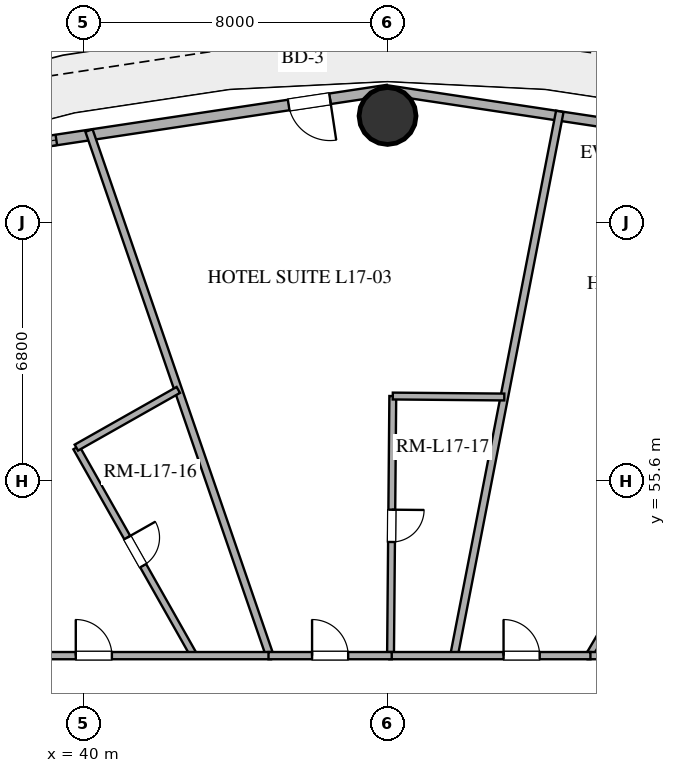
"""IFC4 building model, lengths in metres.
Left out: names, types, materials, properties, quantities, classifications, styles, units other than length and angle.
Written with IfcOpenShell. Run it as: python <this file> out.ifc"""

import sys

from ifc_helpers import new_model, si_unit, direction, frame, frame_2d, origin, origin_2d, place, context, subcontext, project, spatial, rectangle, hollow_circle, extrude, element, fill, save


model = new_model("IFC4")
c1 = context("Model", 3, precision=1e-05, world=origin(), true_north=direction((0.0, 1.0)))
c2 = subcontext(c1, "Body", "Model", "MODEL_VIEW")
j1 = project(units=[si_unit("LENGTHUNIT", "METRE"), si_unit("PLANEANGLEUNIT", "RADIAN")], contexts=[c1])
p1 = place(None, origin())
s1 = spatial("IfcSite", under=j1, at=p1, CompositionType="ELEMENT")
p2 = place(p1, origin())
s2 = spatial("IfcBuilding", under=s1, at=p2, CompositionType="ELEMENT")
p3 = place(p2, frame((0.0, 0.0, 71.4)))
s3 = spatial("IfcBuildingStorey", under=s2, at=p3, CompositionType="ELEMENT", Elevation=71.4)
p4 = place(p3, frame((48.0, 65.2, 0.0), z_axis=(0.0, 0.0, 1.0), x_axis=(1.0, 0.0, 0.0)))
e1 = element("IfcColumn", 1, at=p4, inside=s3, PredefinedType="COLUMN", context=c2, shape_type="SweptSolid", body=[
    extrude(hollow_circle(Radius=0.75, WallThickness=0.04, at=origin_2d()), origin(), (0.0, 0.0, 1.0), 3.38),
])
p5 = place(p3, frame((60.078, 64.062, 0.0), z_axis=(0.0, 0.0, 1.0), x_axis=(-0.988864835849, 0.148816452121, 0.0)))
e2 = element("IfcWall", 2, at=p5, inside=s3, PredefinedType="SOLIDWALL", context=c2, shape_type="SweptSolid", body=[
    extrude(rectangle(XDim=12.214, YDim=0.25, at=frame_2d((6.107, 0.0))), origin(), (0.0, 0.0, 1.0), 3.38),
])
p6 = place(p3, frame((48.0, 65.88, 0.0), z_axis=(0.0, 0.0, 1.0), x_axis=(-0.988864835849, -0.148816452121, 0.0)))
e3 = element("IfcWall", 3, at=p6, inside=s3, PredefinedType="SOLIDWALL", context=c2, shape_type="SweptSolid", body=[
    extrude(rectangle(XDim=12.214, YDim=0.28, at=frame_2d((6.107, 0.0))), origin(), (0.0, 0.0, 1.0), 3.38),
])
p7 = place(p6, frame((1.531, 0.0, 0.0)))
e4 = element("IfcOpeningElement", 4, at=p7, cuts=e3, PredefinedType="OPENING", context=c2, shape_type="SweptSolid", body=[
    extrude(rectangle(XDim=1.1, YDim=2.25, at=frame_2d((0.55, 1.125))), frame((0.0, 0.15, 0.0), z_axis=(0.0, -1.0, 0.0), x_axis=(1.0, 0.0, 0.0)), (0.0, 0.0, 1.0), 0.3),
])
p8 = place(p6, frame((8.814, 0.0, 0.85)))
e5 = element("IfcOpeningElement", 5, at=p8, cuts=e3, PredefinedType="OPENING", context=c2, shape_type="SweptSolid", body=[
    extrude(rectangle(XDim=1.2, YDim=1.6, at=frame_2d((0.6, 0.8))), frame((0.0, 0.15, 0.0), z_axis=(0.0, -1.0, 0.0), x_axis=(1.0, 0.0, 0.0)), (0.0, 0.0, 1.0), 0.3),
])
p9 = place(p3, frame((49.749, 51.0, 0.0), z_axis=(0.0, 0.0, 1.0), x_axis=(0.190815454206, 0.981625927956, 0.0)))
e6 = element("IfcWall", 6, at=p9, inside=s3, PredefinedType="PARTITIONING", context=c2, shape_type="SweptSolid", body=[
    extrude(rectangle(XDim=14.587, YDim=0.2, at=frame_2d((7.293, 0.0))), origin(), (0.0, 0.0, 1.0), 2.74),
])
p10 = place(p3, frame((44.901, 51.0, 0.0), z_axis=(0.0, 0.0, 1.0), x_axis=(-0.325569992405, 0.945517942741, 0.0)))
e7 = element("IfcWall", 7, at=p10, inside=s3, PredefinedType="PARTITIONING", context=c2, shape_type="SweptSolid", body=[
    extrude(rectangle(XDim=14.613, YDim=0.2, at=frame_2d((7.307, 0.0))), origin(), (0.0, 0.0, 1.0), 2.74),
])
p11 = place(p3, frame((56.807, 56.952, 0.0), z_axis=(0.0, 0.0, 1.0), x_axis=(-0.507529744585, -0.861634236995, 0.0)))
e8 = element("IfcWall", 8, at=p11, inside=s3, PredefinedType="PLUMBINGWALL", context=c2, shape_type="SweptSolid", body=[
    extrude(rectangle(XDim=6.908, YDim=0.18, at=frame_2d((3.454, 0.0))), origin(), (0.0, 0.0, 1.0), 2.74),
])
p12 = place(p11, frame((3.029, 0.0, 0.0)))
e9 = element("IfcOpeningElement", 9, at=p12, cuts=e8, PredefinedType="OPENING", context=c2, shape_type="SweptSolid", body=[
    extrude(rectangle(XDim=0.85, YDim=2.1, at=frame_2d((0.425, 1.05))), frame((0.0, 0.1, 0.0), z_axis=(0.0, -1.0, 0.0), x_axis=(1.0, 0.0, 0.0)), (0.0, 0.0, 1.0), 0.2),
])
p13 = place(p3, frame((48.138, 57.83, 0.0), z_axis=(0.0, 0.0, 1.0), x_axis=(-0.008721118088, -0.999961970327, 0.0)))
e10 = element("IfcWall", 10, at=p13, inside=s3, PredefinedType="PLUMBINGWALL", context=c2, shape_type="SweptSolid", body=[
    extrude(rectangle(XDim=6.831, YDim=0.18, at=frame_2d((3.415, 0.0))), origin(), (0.0, 0.0, 1.0), 2.74),
])
p14 = place(p13, frame((2.99, 0.0, 0.0)))
e11 = element("IfcOpeningElement", 11, at=p14, cuts=e10, PredefinedType="OPENING", context=c2, shape_type="SweptSolid", body=[
    extrude(rectangle(XDim=0.85, YDim=2.1, at=frame_2d((0.425, 1.05))), frame((0.0, 0.1, 0.0), z_axis=(0.0, -1.0, 0.0), x_axis=(1.0, 0.0, 0.0)), (0.0, 0.0, 1.0), 0.2),
])
p15 = place(p3, frame((39.811, 56.473, 0.0), z_axis=(0.0, 0.0, 1.0), x_axis=(0.492421798109, -0.870356692826, 0.0)))
e12 = element("IfcWall", 12, at=p15, inside=s3, PredefinedType="PLUMBINGWALL", context=c2, shape_type="SweptSolid", body=[
    extrude(rectangle(XDim=6.289, YDim=0.18, at=frame_2d((3.144, 0.0))), origin(), (0.0, 0.0, 1.0), 2.74),
])
p16 = place(p15, frame((2.719, 0.0, 0.0)))
e13 = element("IfcOpeningElement", 13, at=p16, cuts=e12, PredefinedType="OPENING", context=c2, shape_type="SweptSolid", body=[
    extrude(rectangle(XDim=0.85, YDim=2.1, at=frame_2d((0.425, 1.05))), frame((0.0, 0.1, 0.0), z_axis=(0.0, -1.0, 0.0), x_axis=(1.0, 0.0, 0.0)), (0.0, 0.0, 1.0), 0.2),
])
p17 = place(p3, frame((53.264, 51.0, 0.0), z_axis=(0.0, 0.0, 1.0), x_axis=(1.0, 0.0, 0.0)))
e14 = element("IfcWall", 14, at=p17, inside=s3, PredefinedType="PARTITIONING", context=c2, shape_type="SweptSolid", body=[
    extrude(rectangle(XDim=7.936, YDim=0.19, at=frame_2d((3.968, 0.0))), origin(), (0.0, 0.0, 1.0), 2.74),
])
p18 = place(p17, frame((4.726, 0.0, 0.0)))
e15 = element("IfcOpeningElement", 15, at=p18, cuts=e14, PredefinedType="OPENING", context=c2, shape_type="SweptSolid", body=[
    extrude(rectangle(XDim=1.0, YDim=2.2, at=frame_2d((0.5, 1.1))), frame((0.0, 0.105, 0.0), z_axis=(0.0, -1.0, 0.0), x_axis=(1.0, 0.0, 0.0)), (0.0, 0.0, 1.0), 0.21),
])
p19 = place(p3, frame((34.8, 51.0, 0.0), z_axis=(0.0, 0.0, 1.0), x_axis=(1.0, 0.0, 0.0)))
e16 = element("IfcWall", 16, at=p19, inside=s3, PredefinedType="PARTITIONING", context=c2, shape_type="SweptSolid", body=[
    extrude(rectangle(XDim=10.135, YDim=0.19, at=frame_2d((5.067, 0.0))), origin(), (0.0, 0.0, 1.0), 2.74),
])
p20 = place(p19, frame((4.996, 0.0, 0.0)))
e17 = element("IfcOpeningElement", 17, at=p20, cuts=e16, PredefinedType="OPENING", context=c2, shape_type="SweptSolid", body=[
    extrude(rectangle(XDim=0.95, YDim=2.15, at=frame_2d((0.475, 1.075))), frame((0.0, 0.105, 0.0), z_axis=(0.0, -1.0, 0.0), x_axis=(1.0, 0.0, 0.0)), (0.0, 0.0, 1.0), 0.21),
])
p21 = place(p3, frame((48.046, 51.0, 0.0), z_axis=(0.0, 0.0, 1.0), x_axis=(1.0, 0.0, 0.0)))
e18 = element("IfcWall", 18, at=p21, inside=s3, PredefinedType="PARTITIONING", context=c2, shape_type="SweptSolid", body=[
    extrude(rectangle(XDim=5.292, YDim=0.19, at=frame_2d((2.646, 0.0))), origin(), (0.0, 0.0, 1.0), 2.74),
])
p22 = place(p21, frame((3.006, 0.0, 0.0)))
e19 = element("IfcOpeningElement", 19, at=p22, cuts=e18, PredefinedType="OPENING", context=c2, shape_type="SweptSolid", body=[
    extrude(rectangle(XDim=0.95, YDim=2.15, at=frame_2d((0.475, 1.075))), frame((0.0, 0.105, 0.0), z_axis=(0.0, -1.0, 0.0), x_axis=(1.0, 0.0, 0.0)), (0.0, 0.0, 1.0), 0.21),
])
p23 = place(p3, frame((44.867, 51.0, 0.0), z_axis=(0.0, 0.0, 1.0), x_axis=(1.0, 0.0, 0.0)))
e20 = element("IfcWall", 20, at=p23, inside=s3, PredefinedType="PARTITIONING", context=c2, shape_type="SweptSolid", body=[
    extrude(rectangle(XDim=3.243, YDim=0.19, at=frame_2d((1.622, 0.0))), origin(), (0.0, 0.0, 1.0), 2.74),
])
p24 = place(p23, frame((1.146, 0.0, 0.0)))
e21 = element("IfcOpeningElement", 21, at=p24, cuts=e20, PredefinedType="OPENING", context=c2, shape_type="SweptSolid", body=[
    extrude(rectangle(XDim=0.95, YDim=2.15, at=frame_2d((0.475, 1.075))), frame((0.0, 0.105, 0.0), z_axis=(0.0, -1.0, 0.0), x_axis=(1.0, 0.0, 0.0)), (0.0, 0.0, 1.0), 0.21),
])
p25 = place(p3, frame((42.494, 57.991, 0.0), z_axis=(0.0, 0.0, 1.0), x_axis=(-0.87034589465, -0.492440883422, 0.0)))
e22 = element("IfcWall", 22, at=p25, inside=s3, PredefinedType="PLUMBINGWALL", context=c2, shape_type="SweptSolid", body=[
    extrude(rectangle(XDim=3.082, YDim=0.18, at=frame_2d((1.541, 0.0))), origin(), (0.0, 0.0, 1.0), 2.74),
])
p26 = place(p3, frame((51.072, 57.805, 0.0), z_axis=(0.0, 0.0, 1.0), x_axis=(-0.999961829169, 0.00873728818, 0.0)))
e23 = element("IfcWall", 23, at=p26, inside=s3, PredefinedType="PLUMBINGWALL", context=c2, shape_type="SweptSolid", body=[
    extrude(rectangle(XDim=2.934, YDim=0.18, at=frame_2d((1.467, 0.0))), origin(), (0.0, 0.0, 1.0), 2.74),
])
p27 = place(p7, origin())
e24 = element("IfcDoor", 24, at=p27, inside=s3, OperationType="SINGLE_SWING_LEFT", PredefinedType="DOOR", context=c2, shape_type="SweptSolid", body=[
    extrude(rectangle(XDim=1.1, YDim=2.25, at=frame_2d((0.55, 1.125))), frame((0.0, 0.025, 0.0), z_axis=(0.0, -1.0, 0.0), x_axis=(1.0, 0.0, 0.0)), (0.0, 0.0, 1.0), 0.05),
])
fill(e4, e24)
p28 = place(p8, origin())
e25 = element("IfcWindow", 25, at=p28, inside=s3, PartitioningType="SINGLE_PANEL", PredefinedType="WINDOW", context=c2, shape_type="SweptSolid", body=[
    extrude(rectangle(XDim=1.2, YDim=1.6, at=frame_2d((0.6, 0.8))), frame((0.0, 0.03, 0.0), z_axis=(0.0, -1.0, 0.0), x_axis=(1.0, 0.0, 0.0)), (0.0, 0.0, 1.0), 0.06),
])
fill(e5, e25)
p29 = place(p14, origin())
e26 = element("IfcDoor", 26, at=p29, inside=s3, OperationType="SINGLE_SWING_LEFT", PredefinedType="DOOR", context=c2, shape_type="SweptSolid", body=[
    extrude(rectangle(XDim=0.85, YDim=2.1, at=frame_2d((0.425, 1.05))), frame((0.0, 0.025, 0.0), z_axis=(0.0, -1.0, 0.0), x_axis=(1.0, 0.0, 0.0)), (0.0, 0.0, 1.0), 0.05),
])
fill(e11, e26)
p30 = place(p16, origin())
e27 = element("IfcDoor", 27, at=p30, inside=s3, OperationType="SINGLE_SWING_LEFT", PredefinedType="DOOR", context=c2, shape_type="SweptSolid", body=[
    extrude(rectangle(XDim=0.85, YDim=2.1, at=frame_2d((0.425, 1.05))), frame((0.0, 0.025, 0.0), z_axis=(0.0, -1.0, 0.0), x_axis=(1.0, 0.0, 0.0)), (0.0, 0.0, 1.0), 0.05),
])
fill(e13, e27)
p31 = place(p20, origin())
e28 = element("IfcDoor", 28, at=p31, inside=s3, OperationType="SINGLE_SWING_LEFT", PredefinedType="DOOR", context=c2, shape_type="SweptSolid", body=[
    extrude(rectangle(XDim=0.95, YDim=2.15, at=frame_2d((0.475, 1.075))), frame((0.0, 0.025, 0.0), z_axis=(0.0, -1.0, 0.0), x_axis=(1.0, 0.0, 0.0)), (0.0, 0.0, 1.0), 0.05),
])
fill(e17, e28)
p32 = place(p22, origin())
e29 = element("IfcDoor", 29, at=p32, inside=s3, OperationType="SINGLE_SWING_LEFT", PredefinedType="DOOR", context=c2, shape_type="SweptSolid", body=[
    extrude(rectangle(XDim=0.95, YDim=2.15, at=frame_2d((0.475, 1.075))), frame((0.0, 0.025, 0.0), z_axis=(0.0, -1.0, 0.0), x_axis=(1.0, 0.0, 0.0)), (0.0, 0.0, 1.0), 0.05),
])
fill(e19, e29)
p33 = place(p24, origin())
e30 = element("IfcDoor", 30, at=p33, inside=s3, OperationType="SINGLE_SWING_LEFT", PredefinedType="DOOR", context=c2, shape_type="SweptSolid", body=[
    extrude(rectangle(XDim=0.95, YDim=2.15, at=frame_2d((0.475, 1.075))), frame((0.0, 0.025, 0.0), z_axis=(0.0, -1.0, 0.0), x_axis=(1.0, 0.0, 0.0)), (0.0, 0.0, 1.0), 0.05),
])
fill(e21, e30)
save(model, sys.argv[1])
